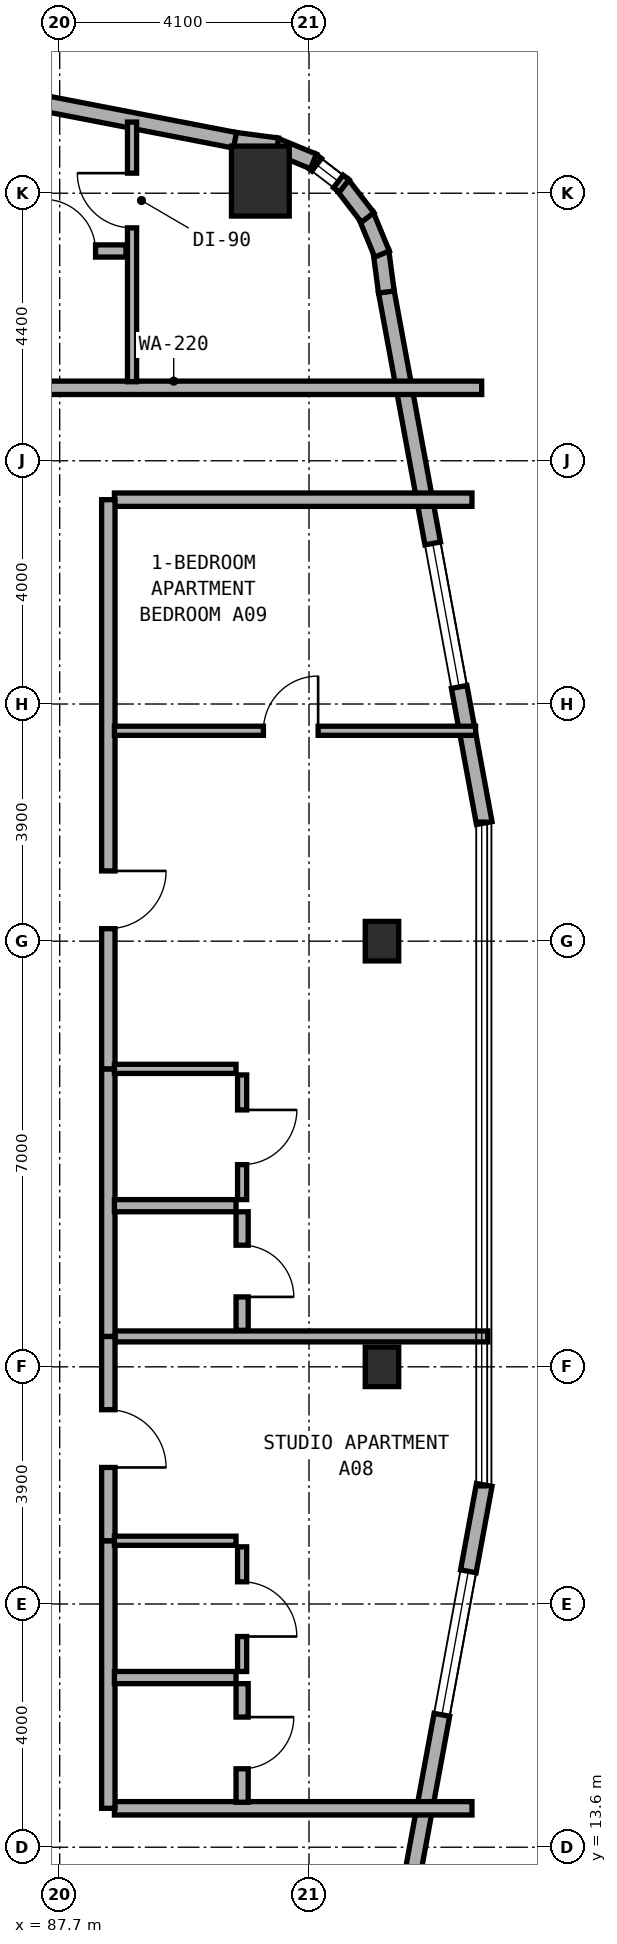
"""IFC4 building model, lengths in metres.
Left out: names, types, materials, properties, quantities, classifications, styles, units other than length and angle.
Written with IfcOpenShell. Run it as: python <this file> out.ifc"""

import sys

from ifc_helpers import new_model, si_unit, direction, frame, frame_2d, origin, origin_2d, place, context, subcontext, project, spatial, rectangle, extrude, element, fill, save


model = new_model("IFC4")
c1 = context("Model", 3, precision=1e-05, world=origin(), true_north=direction((0.0, 1.0)))
c2 = subcontext(c1, "Body", "Model", "MODEL_VIEW")
j1 = project(units=[si_unit("LENGTHUNIT", "METRE"), si_unit("PLANEANGLEUNIT", "RADIAN")], contexts=[c1])
p1 = place(None, origin())
s1 = spatial("IfcSite", under=j1, at=p1, CompositionType="ELEMENT")
p2 = place(p1, origin())
s2 = spatial("IfcBuilding", under=s1, at=p2, CompositionType="ELEMENT")
p3 = place(p2, frame((0.0, 0.0, 124.0)))
s3 = spatial("IfcBuildingStorey", under=s2, at=p3, CompositionType="ELEMENT", Elevation=124.0)
for number, where, z_axis, x_axis in (
    (1, (93.0, 21.5, 0.0), (0.0, 0.0, 1.0), (1.0, 0.0, 0.0)),
    (2, (93.0, 28.5, 0.0), (0.0, 0.0, 1.0), (1.0, 0.0, 0.0)),
):
    element("IfcColumn", number, at=place(p3, frame(where, z_axis=z_axis, x_axis=x_axis)), inside=s3, PredefinedType="COLUMN", context=c2, shape_type="SweptSolid", body=[
        extrude(rectangle(XDim=0.55, YDim=0.65, at=origin_2d()), origin(), (0.0, 0.0, 1.0), 3.5),
    ])
p4 = place(p3, frame((91.0, 41.0, 0.0), z_axis=(0.0, 0.0, 1.0), x_axis=(1.0, 0.0, 0.0)))
e3 = element("IfcColumn", 3, at=p4, inside=s3, PredefinedType="COLUMN", context=c2, shape_type="SweptSolid", body=[
    extrude(rectangle(XDim=0.95, YDim=1.15, at=origin_2d()), origin(), (0.0, 0.0, 1.0), 3.5),
])
p5 = place(p3, frame((93.071, 10.816, 0.0), z_axis=(0.0, 0.0, 1.0), x_axis=(0.181209963057, 0.983444431215, 0.0)))
e4 = element("IfcWall", 4, at=p5, inside=s3, PredefinedType="STANDARD", context=c2, shape_type="SweptSolid", body=[
    extrude(rectangle(XDim=8.889, YDim=0.26, at=frame_2d((4.445, 0.0))), origin(), (0.0, 0.0, 1.0), 3.25),
])
p6 = place(p5, frame((5.045, 0.0, 0.8)))
e5 = element("IfcOpeningElement", 5, at=p6, cuts=e4, PredefinedType="OPENING", context=c2, shape_type="SweptSolid", body=[
    extrude(rectangle(XDim=2.4, YDim=1.6, at=frame_2d((1.2, 0.8))), frame((0.0, 0.14, 0.0), z_axis=(0.0, -1.0, 0.0), x_axis=(1.0, 0.0, 0.0)), (0.0, 0.0, 1.0), 0.28),
])
p7 = place(p3, frame((94.682, 30.442, 0.0), z_axis=(0.0, 0.0, 1.0), x_axis=(-0.181209963057, 0.983444431215, 0.0)))
e6 = element("IfcWall", 6, at=p7, inside=s3, PredefinedType="STANDARD", context=c2, shape_type="SweptSolid", body=[
    extrude(rectangle(XDim=8.889, YDim=0.26, at=frame_2d((4.445, 0.0))), origin(), (0.0, 0.0, 1.0), 3.25),
])
p8 = place(p7, frame((2.276, 0.0, 0.8)))
e7 = element("IfcOpeningElement", 7, at=p8, cuts=e6, PredefinedType="OPENING", context=c2, shape_type="SweptSolid", body=[
    extrude(rectangle(XDim=2.4, YDim=1.6, at=frame_2d((1.2, 0.8))), frame((0.0, 0.14, 0.0), z_axis=(0.0, -1.0, 0.0), x_axis=(1.0, 0.0, 0.0)), (0.0, 0.0, 1.0), 0.28),
])
p9 = place(p3, frame((93.072, 39.175, 0.0), z_axis=(0.0, 0.0, 1.0), x_axis=(-0.131667498923, 0.991293937098, 0.0)))
e8 = element("IfcWall", 8, at=p9, inside=s3, PredefinedType="STANDARD", context=c2, shape_type="SweptSolid", body=[
    extrude(rectangle(XDim=0.677, YDim=0.26, at=frame_2d((0.338, 0.0))), origin(), (0.0, 0.0, 1.0), 3.25),
])
p10 = place(p3, frame((93.001, 39.8, 0.0), z_axis=(0.0, 0.0, 1.0), x_axis=(-0.381988976935, 0.924166879681, 0.0)))
e9 = element("IfcWall", 9, at=p10, inside=s3, PredefinedType="STANDARD", context=c2, shape_type="SweptSolid", body=[
    extrude(rectangle(XDim=0.693, YDim=0.26, at=frame_2d((0.347, 0.0))), origin(), (0.0, 0.0, 1.0), 3.25),
])
p11 = place(p3, frame((92.764, 40.401, 0.0), z_axis=(0.0, 0.0, 1.0), x_axis=(-0.609472651958, 0.792807092876, 0.0)))
e10 = element("IfcWall", 10, at=p11, inside=s3, PredefinedType="STANDARD", context=c2, shape_type="SweptSolid", body=[
    extrude(rectangle(XDim=0.694, YDim=0.26, at=frame_2d((0.347, 0.0))), origin(), (0.0, 0.0, 1.0), 3.25),
])
p12 = place(p3, frame((92.379, 40.92, 0.0), z_axis=(0.0, 0.0, 1.0), x_axis=(-0.792506234191, 0.609863811657, 0.0)))
e11 = element("IfcWall", 11, at=p12, inside=s3, PredefinedType="STANDARD", context=c2, shape_type="SweptSolid", body=[
    extrude(rectangle(XDim=0.694, YDim=0.26, at=frame_2d((0.347, 0.0))), origin(), (0.0, 0.0, 1.0), 3.25),
])
p13 = place(p12, frame((0.122, 0.0, 0.85)))
e12 = element("IfcOpeningElement", 12, at=p13, cuts=e11, PredefinedType="OPENING", context=c2, shape_type="SweptSolid", body=[
    extrude(rectangle(XDim=0.45, YDim=1.5, at=frame_2d((0.225, 0.75))), frame((0.0, 0.14, 0.0), z_axis=(0.0, -1.0, 0.0), x_axis=(1.0, 0.0, 0.0)), (0.0, 0.0, 1.0), 0.28),
])
p14 = place(p3, frame((91.873, 41.322, 0.0), z_axis=(0.0, 0.0, 1.0), x_axis=(-0.92421822618, 0.381864727877, 0.0)))
e13 = element("IfcWall", 13, at=p14, inside=s3, PredefinedType="STANDARD", context=c2, shape_type="SweptSolid", body=[
    extrude(rectangle(XDim=0.694, YDim=0.26, at=frame_2d((0.347, 0.0))), origin(), (0.0, 0.0, 1.0), 3.25),
])
p15 = place(p3, frame((91.281, 41.579, 0.0), z_axis=(0.0, 0.0, 1.0), x_axis=(-0.991433279471, 0.130614135366, 0.0)))
e14 = element("IfcWall", 14, at=p15, inside=s3, PredefinedType="STANDARD", context=c2, shape_type="SweptSolid", body=[
    extrude(rectangle(XDim=0.712, YDim=0.26, at=frame_2d((0.356, 0.0))), origin(), (0.0, 0.0, 1.0), 3.25),
])
p16 = place(p3, frame((90.583, 41.67, 0.0), z_axis=(0.0, 0.0, 1.0), x_axis=(-0.98174070399, 0.190224052445, 0.0)))
e15 = element("IfcWall", 15, at=p16, inside=s3, PredefinedType="STANDARD", context=c2, shape_type="SweptSolid", body=[
    extrude(rectangle(XDim=8.412, YDim=0.26, at=frame_2d((4.206, 0.0))), origin(), (0.0, 0.0, 1.0), 3.25),
])
p17 = place(p16, frame((3.905, 0.0, 0.8)))
e16 = element("IfcOpeningElement", 16, at=p17, cuts=e15, PredefinedType="OPENING", context=c2, shape_type="SweptSolid", body=[
    extrude(rectangle(XDim=2.4, YDim=1.6, at=frame_2d((1.2, 0.8))), frame((0.0, 0.14, 0.0), z_axis=(0.0, -1.0, 0.0), x_axis=(1.0, 0.0, 0.0)), (0.0, 0.0, 1.0), 0.28),
])
p18 = place(p3, frame((84.51, 37.6, 0.0), z_axis=(0.0, 0.0, 1.0), x_axis=(1.0, 0.0, 0.0)))
e17 = element("IfcWall", 17, at=p18, inside=s3, PredefinedType="SOLIDWALL", context=c2, shape_type="SweptSolid", body=[
    extrude(rectangle(XDim=10.13, YDim=0.22, at=frame_2d((5.065, 0.0))), origin(), (0.0, 0.0, 1.0), 2.945),
])
p19 = place(p3, frame((88.89, 37.7, 0.0), z_axis=(0.0, 0.0, 1.0), x_axis=(0.0, 1.0, 0.0)))
e18 = element("IfcWall", 18, at=p19, inside=s3, PredefinedType="PARTITIONING", context=c2, shape_type="SweptSolid", body=[
    extrude(rectangle(XDim=4.27, YDim=0.15, at=frame_2d((2.135, 0.0))), origin(), (0.0, 0.0, 1.0), 2.945),
])
p20 = place(p19, frame((2.53, 0.0, 0.0)))
e19 = element("IfcOpeningElement", 19, at=p20, cuts=e18, PredefinedType="OPENING", context=c2, shape_type="SweptSolid", body=[
    extrude(rectangle(XDim=0.9, YDim=2.1, at=frame_2d((0.45, 1.05))), frame((0.0, 0.085, 0.0), z_axis=(0.0, -1.0, 0.0), x_axis=(1.0, 0.0, 0.0)), (0.0, 0.0, 1.0), 0.17),
])
p21 = place(p3, frame((86.94, 39.85, 0.0), z_axis=(0.0, 0.0, 1.0), x_axis=(1.0, 0.0, 0.0)))
e20 = element("IfcWall", 20, at=p21, inside=s3, PredefinedType="PLUMBINGWALL", context=c2, shape_type="SweptSolid", body=[
    extrude(rectangle(XDim=1.85, YDim=0.2, at=frame_2d((0.925, 0.0))), origin(), (0.0, 0.0, 1.0), 3.22),
])
p22 = place(p21, frame((0.5, 0.0, 0.0)))
e21 = element("IfcOpeningElement", 21, at=p22, cuts=e20, PredefinedType="OPENING", context=c2, shape_type="SweptSolid", body=[
    extrude(rectangle(XDim=0.85, YDim=2.1, at=frame_2d((0.425, 1.05))), frame((0.0, 0.11, 0.0), z_axis=(0.0, -1.0, 0.0), x_axis=(1.0, 0.0, 0.0)), (0.0, 0.0, 1.0), 0.22),
])
for number, where, z_axis, x_axis in (
    (22, (88.6, 14.24, 0.0), (0.0, 0.0, 1.0), (1.0, 0.0, 0.0)),
    (23, (88.6, 35.76, 0.0), (0.0, 0.0, 1.0), (1.0, 0.0, 0.0)),
):
    element("IfcWall", number, at=place(p3, frame(where, z_axis=z_axis, x_axis=x_axis)), inside=s3, PredefinedType="SOLIDWALL", context=c2, shape_type="SweptSolid", body=[
        extrude(rectangle(XDim=5.88, YDim=0.22, at=frame_2d((2.94, 0.0))), origin(), (0.0, 0.0, 1.0), 2.945),
    ])
p23 = place(p3, frame((88.5, 22.0, 0.0), z_axis=(0.0, 0.0, 1.0), x_axis=(1.0, 0.0, 0.0)))
e24 = element("IfcWall", 24, at=p23, inside=s3, PredefinedType="SOLIDWALL", context=c2, shape_type="SweptSolid", body=[
    extrude(rectangle(XDim=6.24, YDim=0.18, at=frame_2d((3.12, 0.0))), origin(), (0.0, 0.0, 1.0), 2.945),
])
p24 = place(p3, frame((88.5, 14.24, 0.0), z_axis=(0.0, 0.0, 1.0), x_axis=(0.0, 1.0, 0.0)))
e25 = element("IfcWall", 25, at=p24, inside=s3, PredefinedType="SOLIDWALL", context=c2, shape_type="SweptSolid", body=[
    extrude(rectangle(XDim=4.4, YDim=0.22, at=frame_2d((2.2, 0.0))), origin(), (0.0, 0.0, 1.0), 3.22),
])
p25 = place(p3, frame((88.5, 18.64, 0.0), z_axis=(0.0, 0.0, 1.0), x_axis=(0.0, 1.0, 0.0)))
e26 = element("IfcWall", 26, at=p25, inside=s3, PredefinedType="SOLIDWALL", context=c2, shape_type="SweptSolid", body=[
    extrude(rectangle(XDim=3.36, YDim=0.22, at=frame_2d((1.68, 0.0))), origin(), (0.0, 0.0, 1.0), 2.825),
])
p26 = place(p25, frame((1.205, 0.0, 0.0)))
e27 = element("IfcOpeningElement", 27, at=p26, cuts=e26, PredefinedType="OPENING", context=c2, shape_type="SweptSolid", body=[
    extrude(rectangle(XDim=0.95, YDim=2.1, at=frame_2d((0.475, 1.05))), frame((0.0, 0.12, 0.0), z_axis=(0.0, -1.0, 0.0), x_axis=(1.0, 0.0, 0.0)), (0.0, 0.0, 1.0), 0.24),
])
p27 = place(p3, frame((88.6, 16.39, 0.0), z_axis=(0.0, 0.0, 1.0), x_axis=(1.0, 0.0, 0.0)))
e28 = element("IfcWall", 28, at=p27, inside=s3, PredefinedType="PLUMBINGWALL", context=c2, shape_type="SweptSolid", body=[
    extrude(rectangle(XDim=2.0, YDim=0.2, at=frame_2d((1.0, 0.0))), origin(), (0.0, 0.0, 1.0), 3.22),
])
p28 = place(p3, frame((88.6, 18.64, 0.0), z_axis=(0.0, 0.0, 1.0), x_axis=(1.0, 0.0, 0.0)))
e29 = element("IfcWall", 29, at=p28, inside=s3, PredefinedType="PARTITIONING", context=c2, shape_type="SweptSolid", body=[
    extrude(rectangle(XDim=2.0, YDim=0.15, at=frame_2d((1.0, 0.0))), origin(), (0.0, 0.0, 1.0), 3.22),
])
p29 = place(p3, frame((90.7, 14.34, 0.0), z_axis=(0.0, 0.0, 1.0), x_axis=(0.0, 1.0, 0.0)))
e30 = element("IfcWall", 30, at=p29, inside=s3, PredefinedType="PLUMBINGWALL", context=c2, shape_type="SweptSolid", body=[
    extrude(rectangle(XDim=1.95, YDim=0.2, at=frame_2d((0.975, 0.0))), origin(), (0.0, 0.0, 1.0), 3.22),
])
p30 = place(p29, frame((0.55, 0.0, 0.0)))
e31 = element("IfcOpeningElement", 31, at=p30, cuts=e30, PredefinedType="OPENING", context=c2, shape_type="SweptSolid", body=[
    extrude(rectangle(XDim=0.85, YDim=2.1, at=frame_2d((0.425, 1.05))), frame((0.0, 0.11, 0.0), z_axis=(0.0, -1.0, 0.0), x_axis=(1.0, 0.0, 0.0)), (0.0, 0.0, 1.0), 0.22),
])
p31 = place(p3, frame((90.7, 16.49, 0.0), z_axis=(0.0, 0.0, 1.0), x_axis=(0.0, 1.0, 0.0)))
e32 = element("IfcWall", 32, at=p31, inside=s3, PredefinedType="PARTITIONING", context=c2, shape_type="SweptSolid", body=[
    extrude(rectangle(XDim=2.05, YDim=0.15, at=frame_2d((1.025, 0.0))), origin(), (0.0, 0.0, 1.0), 3.22),
])
p32 = place(p31, frame((0.575, 0.0, 0.0)))
e33 = element("IfcOpeningElement", 33, at=p32, cuts=e32, PredefinedType="OPENING", context=c2, shape_type="SweptSolid", body=[
    extrude(rectangle(XDim=0.9, YDim=2.1, at=frame_2d((0.45, 1.05))), frame((0.0, 0.085, 0.0), z_axis=(0.0, -1.0, 0.0), x_axis=(1.0, 0.0, 0.0)), (0.0, 0.0, 1.0), 0.17),
])
p33 = place(p3, frame((88.5, 22.0, 0.0), z_axis=(0.0, 0.0, 1.0), x_axis=(0.0, 1.0, 0.0)))
e34 = element("IfcWall", 34, at=p33, inside=s3, PredefinedType="SOLIDWALL", context=c2, shape_type="SweptSolid", body=[
    extrude(rectangle(XDim=4.4, YDim=0.22, at=frame_2d((2.2, 0.0))), origin(), (0.0, 0.0, 1.0), 3.22),
])
p34 = place(p3, frame((88.5, 26.4, 0.0), z_axis=(0.0, 0.0, 1.0), x_axis=(0.0, 1.0, 0.0)))
e35 = element("IfcWall", 35, at=p34, inside=s3, PredefinedType="SOLIDWALL", context=c2, shape_type="SweptSolid", body=[
    extrude(rectangle(XDim=9.36, YDim=0.22, at=frame_2d((4.68, 0.0))), origin(), (0.0, 0.0, 1.0), 2.825),
])
p35 = place(p34, frame((2.305, 0.0, 0.0)))
e36 = element("IfcOpeningElement", 36, at=p35, cuts=e35, PredefinedType="OPENING", context=c2, shape_type="SweptSolid", body=[
    extrude(rectangle(XDim=0.95, YDim=2.1, at=frame_2d((0.475, 1.05))), frame((0.0, 0.12, 0.0), z_axis=(0.0, -1.0, 0.0), x_axis=(1.0, 0.0, 0.0)), (0.0, 0.0, 1.0), 0.24),
])
p36 = place(p3, frame((88.6, 31.96, 0.0), z_axis=(0.0, 0.0, 1.0), x_axis=(1.0, 0.0, 0.0)))
e37 = element("IfcWall", 37, at=p36, inside=s3, PredefinedType="PARTITIONING", context=c2, shape_type="SweptSolid", body=[
    extrude(rectangle(XDim=5.94, YDim=0.15, at=frame_2d((2.97, 0.0))), origin(), (0.0, 0.0, 1.0), 2.945),
])
p37 = place(p36, frame((2.45, 0.0, 0.0)))
e38 = element("IfcOpeningElement", 38, at=p37, cuts=e37, PredefinedType="OPENING", context=c2, shape_type="SweptSolid", body=[
    extrude(rectangle(XDim=0.9, YDim=2.1, at=frame_2d((0.45, 1.05))), frame((0.0, 0.085, 0.0), z_axis=(0.0, -1.0, 0.0), x_axis=(1.0, 0.0, 0.0)), (0.0, 0.0, 1.0), 0.17),
])
p38 = place(p3, frame((88.6, 24.15, 0.0), z_axis=(0.0, 0.0, 1.0), x_axis=(1.0, 0.0, 0.0)))
e39 = element("IfcWall", 39, at=p38, inside=s3, PredefinedType="PLUMBINGWALL", context=c2, shape_type="SweptSolid", body=[
    extrude(rectangle(XDim=2.0, YDim=0.2, at=frame_2d((1.0, 0.0))), origin(), (0.0, 0.0, 1.0), 3.22),
])
p39 = place(p3, frame((88.6, 26.4, 0.0), z_axis=(0.0, 0.0, 1.0), x_axis=(1.0, 0.0, 0.0)))
e40 = element("IfcWall", 40, at=p39, inside=s3, PredefinedType="PARTITIONING", context=c2, shape_type="SweptSolid", body=[
    extrude(rectangle(XDim=2.0, YDim=0.15, at=frame_2d((1.0, 0.0))), origin(), (0.0, 0.0, 1.0), 3.22),
])
p40 = place(p3, frame((90.7, 22.1, 0.0), z_axis=(0.0, 0.0, 1.0), x_axis=(0.0, 1.0, 0.0)))
e41 = element("IfcWall", 41, at=p40, inside=s3, PredefinedType="PLUMBINGWALL", context=c2, shape_type="SweptSolid", body=[
    extrude(rectangle(XDim=1.95, YDim=0.2, at=frame_2d((0.975, 0.0))), origin(), (0.0, 0.0, 1.0), 3.22),
])
p41 = place(p40, frame((0.55, 0.0, 0.0)))
e42 = element("IfcOpeningElement", 42, at=p41, cuts=e41, PredefinedType="OPENING", context=c2, shape_type="SweptSolid", body=[
    extrude(rectangle(XDim=0.85, YDim=2.1, at=frame_2d((0.425, 1.05))), frame((0.0, 0.11, 0.0), z_axis=(0.0, -1.0, 0.0), x_axis=(1.0, 0.0, 0.0)), (0.0, 0.0, 1.0), 0.22),
])
p42 = place(p3, frame((90.7, 24.25, 0.0), z_axis=(0.0, 0.0, 1.0), x_axis=(0.0, 1.0, 0.0)))
e43 = element("IfcWall", 43, at=p42, inside=s3, PredefinedType="PARTITIONING", context=c2, shape_type="SweptSolid", body=[
    extrude(rectangle(XDim=2.05, YDim=0.15, at=frame_2d((1.025, 0.0))), origin(), (0.0, 0.0, 1.0), 3.22),
])
p43 = place(p42, frame((0.575, 0.0, 0.0)))
e44 = element("IfcOpeningElement", 44, at=p43, cuts=e43, PredefinedType="OPENING", context=c2, shape_type="SweptSolid", body=[
    extrude(rectangle(XDim=0.9, YDim=2.1, at=frame_2d((0.45, 1.05))), frame((0.0, 0.085, 0.0), z_axis=(0.0, -1.0, 0.0), x_axis=(1.0, 0.0, 0.0)), (0.0, 0.0, 1.0), 0.17),
])
p44 = place(p6, origin())
e45 = element("IfcWindow", 45, at=p44, inside=s3, PartitioningType="SINGLE_PANEL", PredefinedType="WINDOW", context=c2, shape_type="SweptSolid", body=[
    extrude(rectangle(XDim=2.4, YDim=1.6, at=frame_2d((1.2, 0.8))), frame((0.0, 0.03, 0.0), z_axis=(0.0, -1.0, 0.0), x_axis=(1.0, 0.0, 0.0)), (0.0, 0.0, 1.0), 0.06),
])
fill(e5, e45)
p45 = place(p8, origin())
e46 = element("IfcWindow", 46, at=p45, inside=s3, PartitioningType="SINGLE_PANEL", PredefinedType="WINDOW", context=c2, shape_type="SweptSolid", body=[
    extrude(rectangle(XDim=2.4, YDim=1.6, at=frame_2d((1.2, 0.8))), frame((0.0, 0.03, 0.0), z_axis=(0.0, -1.0, 0.0), x_axis=(1.0, 0.0, 0.0)), (0.0, 0.0, 1.0), 0.06),
])
fill(e7, e46)
p46 = place(p13, origin())
e47 = element("IfcWindow", 47, at=p46, inside=s3, PartitioningType="SINGLE_PANEL", PredefinedType="WINDOW", context=c2, shape_type="SweptSolid", body=[
    extrude(rectangle(XDim=0.45, YDim=1.5, at=frame_2d((0.225, 0.75))), frame((0.0, 0.03, 0.0), z_axis=(0.0, -1.0, 0.0), x_axis=(1.0, 0.0, 0.0)), (0.0, 0.0, 1.0), 0.06),
])
fill(e12, e47)
p47 = place(p20, origin())
e48 = element("IfcDoor", 48, at=p47, inside=s3, OperationType="SINGLE_SWING_RIGHT", PredefinedType="DOOR", context=c2, shape_type="SweptSolid", body=[
    extrude(rectangle(XDim=0.9, YDim=2.1, at=frame_2d((0.45, 1.05))), frame((0.0, 0.025, 0.0), z_axis=(0.0, -1.0, 0.0), x_axis=(1.0, 0.0, 0.0)), (0.0, 0.0, 1.0), 0.05),
])
fill(e19, e48)
p48 = place(p22, origin())
e49 = element("IfcDoor", 49, at=p48, inside=s3, OperationType="SINGLE_SWING_LEFT", PredefinedType="DOOR", context=c2, shape_type="SweptSolid", body=[
    extrude(rectangle(XDim=0.85, YDim=2.1, at=frame_2d((0.425, 1.05))), frame((0.0, 0.025, 0.0), z_axis=(0.0, -1.0, 0.0), x_axis=(1.0, 0.0, 0.0)), (0.0, 0.0, 1.0), 0.05),
])
fill(e21, e49)
p49 = place(p26, frame((0.95, 0.0, 0.0), z_axis=(0.0, 0.0, 1.0), x_axis=(-1.0, 0.0, 0.0)))
e50 = element("IfcDoor", 50, at=p49, inside=s3, OperationType="SINGLE_SWING_RIGHT", PredefinedType="DOOR", context=c2, shape_type="SweptSolid", body=[
    extrude(rectangle(XDim=0.95, YDim=2.1, at=frame_2d((0.475, 1.05))), frame((0.0, 0.025, 0.0), z_axis=(0.0, -1.0, 0.0), x_axis=(1.0, 0.0, 0.0)), (0.0, 0.0, 1.0), 0.05),
])
fill(e27, e50)
p50 = place(p30, frame((0.85, 0.0, 0.0), z_axis=(0.0, 0.0, 1.0), x_axis=(-1.0, 0.0, 0.0)))
e51 = element("IfcDoor", 51, at=p50, inside=s3, OperationType="SINGLE_SWING_LEFT", PredefinedType="DOOR", context=c2, shape_type="SweptSolid", body=[
    extrude(rectangle(XDim=0.85, YDim=2.1, at=frame_2d((0.425, 1.05))), frame((0.0, 0.025, 0.0), z_axis=(0.0, -1.0, 0.0), x_axis=(1.0, 0.0, 0.0)), (0.0, 0.0, 1.0), 0.05),
])
fill(e31, e51)
p51 = place(p32, frame((0.9, 0.0, 0.0), z_axis=(0.0, 0.0, 1.0), x_axis=(-1.0, 0.0, 0.0)))
e52 = element("IfcDoor", 52, at=p51, inside=s3, OperationType="SINGLE_SWING_RIGHT", PredefinedType="DOOR", context=c2, shape_type="SweptSolid", body=[
    extrude(rectangle(XDim=0.9, YDim=2.1, at=frame_2d((0.45, 1.05))), frame((0.0, 0.025, 0.0), z_axis=(0.0, -1.0, 0.0), x_axis=(1.0, 0.0, 0.0)), (0.0, 0.0, 1.0), 0.05),
])
fill(e33, e52)
p52 = place(p35, frame((0.95, 0.0, 0.0), z_axis=(0.0, 0.0, 1.0), x_axis=(-1.0, 0.0, 0.0)))
e53 = element("IfcDoor", 53, at=p52, inside=s3, OperationType="SINGLE_SWING_LEFT", PredefinedType="DOOR", context=c2, shape_type="SweptSolid", body=[
    extrude(rectangle(XDim=0.95, YDim=2.1, at=frame_2d((0.475, 1.05))), frame((0.0, 0.025, 0.0), z_axis=(0.0, -1.0, 0.0), x_axis=(1.0, 0.0, 0.0)), (0.0, 0.0, 1.0), 0.05),
])
fill(e36, e53)
p53 = place(p37, origin())
e54 = element("IfcDoor", 54, at=p53, inside=s3, OperationType="SINGLE_SWING_RIGHT", PredefinedType="DOOR", context=c2, shape_type="SweptSolid", body=[
    extrude(rectangle(XDim=0.9, YDim=2.1, at=frame_2d((0.45, 1.05))), frame((0.0, 0.025, 0.0), z_axis=(0.0, -1.0, 0.0), x_axis=(1.0, 0.0, 0.0)), (0.0, 0.0, 1.0), 0.05),
])
fill(e38, e54)
p54 = place(p41, frame((0.85, 0.0, 0.0), z_axis=(0.0, 0.0, 1.0), x_axis=(-1.0, 0.0, 0.0)))
e55 = element("IfcDoor", 55, at=p54, inside=s3, OperationType="SINGLE_SWING_RIGHT", PredefinedType="DOOR", context=c2, shape_type="SweptSolid", body=[
    extrude(rectangle(XDim=0.85, YDim=2.1, at=frame_2d((0.425, 1.05))), frame((0.0, 0.025, 0.0), z_axis=(0.0, -1.0, 0.0), x_axis=(1.0, 0.0, 0.0)), (0.0, 0.0, 1.0), 0.05),
])
fill(e42, e55)
p55 = place(p43, frame((0.9, 0.0, 0.0), z_axis=(0.0, 0.0, 1.0), x_axis=(-1.0, 0.0, 0.0)))
e56 = element("IfcDoor", 56, at=p55, inside=s3, OperationType="SINGLE_SWING_LEFT", PredefinedType="DOOR", context=c2, shape_type="SweptSolid", body=[
    extrude(rectangle(XDim=0.9, YDim=2.1, at=frame_2d((0.45, 1.05))), frame((0.0, 0.025, 0.0), z_axis=(0.0, -1.0, 0.0), x_axis=(1.0, 0.0, 0.0)), (0.0, 0.0, 1.0), 0.05),
])
fill(e44, e56)
save(model, sys.argv[1])
